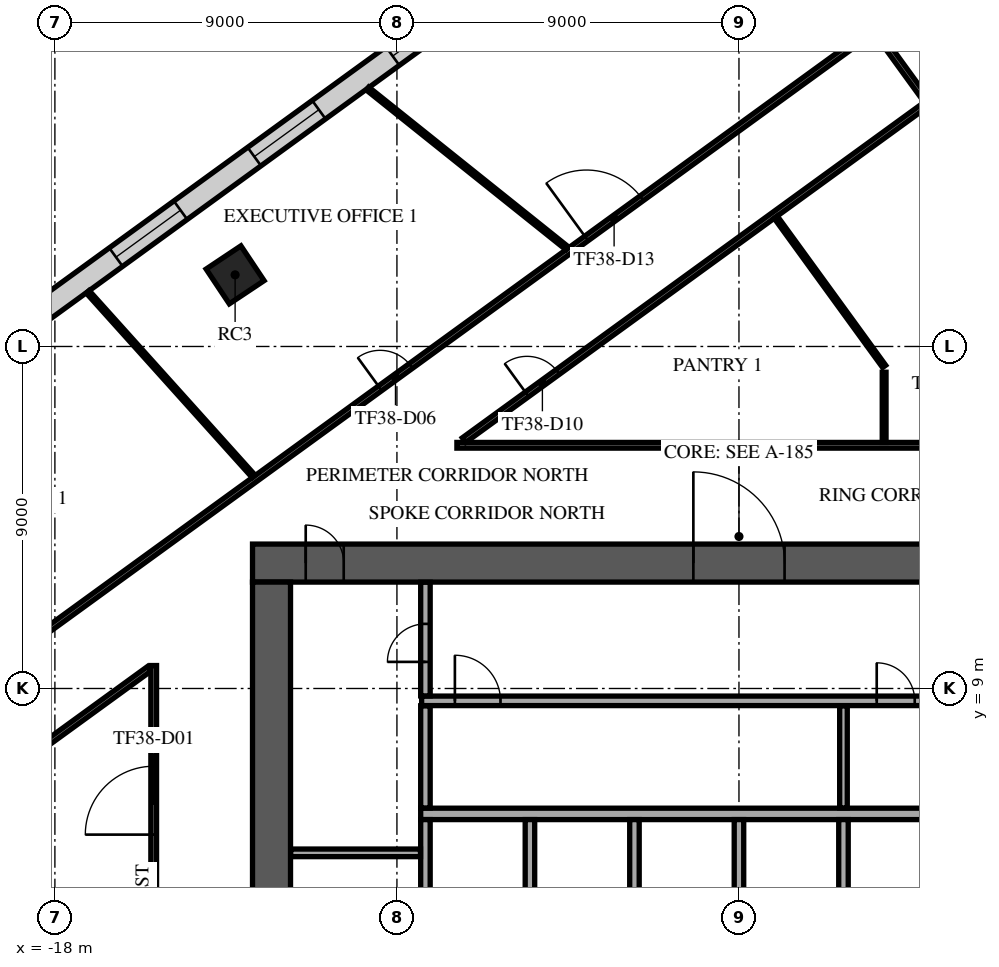
"""IFC4 building model, lengths in metres.
Left out: names, types, materials, properties, quantities, classifications, styles, units other than length and angle.
Written with IfcOpenShell. Run it as: python <this file> out.ifc"""

import sys

from ifc_helpers import new_model, si_unit, direction, frame, frame_2d, origin, origin_2d, place, context, subcontext, project, spatial, rectangle, extrude, element, fill, save


model = new_model("IFC4")
c1 = context("Model", 3, precision=1e-05, world=origin(), true_north=direction((0.0, 1.0)))
c2 = subcontext(c1, "Body", "Model", "MODEL_VIEW")
j1 = project(units=[si_unit("LENGTHUNIT", "METRE"), si_unit("PLANEANGLEUNIT", "RADIAN")], contexts=[c1])
p1 = place(None, origin())
s1 = spatial("IfcSite", under=j1, at=p1, CompositionType="ELEMENT")
p2 = place(p1, origin())
s2 = spatial("IfcBuilding", under=s1, at=p2, CompositionType="ELEMENT")
p3 = place(p2, frame((0.0, 0.0, 163.7)))
s3 = spatial("IfcBuildingStorey", under=s2, at=p3, CompositionType="ELEMENT", Elevation=163.7)
p4 = place(p3, frame((-13.258, 19.885, 0.0), z_axis=(0.0, 0.0, 1.0), x_axis=(0.832028680356, 0.55473261583, 0.0)))
e1 = element("IfcColumn", 1, at=p4, inside=s3, PredefinedType="COLUMN", context=c2, shape_type="SweptSolid", body=[
    extrude(rectangle(XDim=1.1, YDim=1.1, at=origin_2d()), origin(), (0.0, 0.0, 1.0), 4.0),
])
p5 = place(p3, frame((-12.8, 12.3, 0.0), z_axis=(0.0, 0.0, 1.0), x_axis=(1.0, 0.0, 0.0)))
e2 = element("IfcWall", 2, at=p5, inside=s3, PredefinedType="SHEAR", context=c2, shape_type="SweptSolid", body=[
    extrude(rectangle(XDim=25.6, YDim=1.0, at=frame_2d((12.8, 0.0))), origin(), (0.0, 0.0, 1.0), 3.6),
])
p6 = place(p5, frame((11.6, 0.0, 0.0)))
e3 = element("IfcOpeningElement", 3, at=p6, cuts=e2, PredefinedType="OPENING", context=c2, shape_type="SweptSolid", body=[
    extrude(rectangle(XDim=2.4, YDim=2.4, at=frame_2d((1.2, 1.2))), frame((0.0, 0.51, 0.0), z_axis=(0.0, -1.0, 0.0), x_axis=(1.0, 0.0, 0.0)), (0.0, 0.0, 1.0), 1.02),
])
p7 = place(p5, frame((22.425, 0.0, 0.0)))
e4 = element("IfcOpeningElement", 4, at=p7, cuts=e2, PredefinedType="OPENING", context=c2, shape_type="SweptSolid", body=[
    extrude(rectangle(XDim=1.2, YDim=2.1, at=frame_2d((0.6, 1.05))), frame((0.0, 0.51, 0.0), z_axis=(0.0, -1.0, 0.0), x_axis=(1.0, 0.0, 0.0)), (0.0, 0.0, 1.0), 1.02),
])
p8 = place(p5, frame((1.4, 0.0, 0.0)))
e5 = element("IfcOpeningElement", 5, at=p8, cuts=e2, PredefinedType="OPENING", context=c2, shape_type="SweptSolid", body=[
    extrude(rectangle(XDim=1.0, YDim=2.1, at=frame_2d((0.5, 1.05))), frame((0.0, 0.51, 0.0), z_axis=(0.0, -1.0, 0.0), x_axis=(1.0, 0.0, 0.0)), (0.0, 0.0, 1.0), 1.02),
])
p9 = place(p3, frame((-12.3, -11.8, 0.0), z_axis=(0.0, 0.0, 1.0), x_axis=(0.0, 1.0, 0.0)))
e6 = element("IfcWall", 6, at=p9, inside=s3, PredefinedType="SHEAR", context=c2, shape_type="SweptSolid", body=[
    extrude(rectangle(XDim=23.6, YDim=1.0, at=frame_2d((11.8, 0.0))), origin(), (0.0, 0.0, 1.0), 3.6),
])
p10 = place(p9, frame((10.6, 0.0, 0.0)))
e7 = element("IfcOpeningElement", 7, at=p10, cuts=e6, PredefinedType="OPENING", context=c2, shape_type="SweptSolid", body=[
    extrude(rectangle(XDim=2.4, YDim=2.4, at=frame_2d((1.2, 1.2))), frame((0.0, 0.51, 0.0), z_axis=(0.0, -1.0, 0.0), x_axis=(1.0, 0.0, 0.0)), (0.0, 0.0, 1.0), 1.02),
])
p11 = place(p3, frame((-8.375, 5.7, 0.0), z_axis=(0.0, 0.0, 1.0), x_axis=(1.0, 0.0, 0.0)))
e8 = element("IfcWall", 8, at=p11, inside=s3, PredefinedType="SOLIDWALL", context=c2, shape_type="SweptSolid", body=[
    extrude(rectangle(XDim=16.75, YDim=0.3, at=frame_2d((8.375, 0.0))), origin(), (0.0, 0.0, 1.0), 3.6),
])
for number, where, z_axis, x_axis in (
    (9, (-8.25, 2.85, 0.0), (0.0, 0.0, 1.0), (0.0, 1.0, 0.0)),
    (10, (-5.5, 2.85, 0.0), (0.0, 0.0, 1.0), (0.0, 1.0, 0.0)),
    (11, (-2.75, 2.85, 0.0), (0.0, 0.0, 1.0), (0.0, 1.0, 0.0)),
    (12, (0.0, 2.85, 0.0), (0.0, 0.0, 1.0), (0.0, 1.0, 0.0)),
    (13, (2.75, 2.85, 0.0), (0.0, 0.0, 1.0), (0.0, 1.0, 0.0)),
):
    element("IfcWall", number, at=place(p3, frame(where, z_axis=z_axis, x_axis=x_axis)), inside=s3, PredefinedType="SOLIDWALL", context=c2, shape_type="SweptSolid", body=[
        extrude(rectangle(XDim=2.7, YDim=0.25, at=frame_2d((1.35, 0.0))), origin(), (0.0, 0.0, 1.0), 3.6),
    ])
p12 = place(p3, frame((-11.795, 4.675, 0.0), z_axis=(0.0, 0.0, 1.0), x_axis=(1.0, 0.0, 0.0)))
e14 = element("IfcWall", 14, at=p12, inside=s3, PredefinedType="PARTITIONING", context=c2, shape_type="SweptSolid", body=[
    extrude(rectangle(XDim=3.415, YDim=0.2, at=frame_2d((1.708, 0.0))), origin(), (0.0, 0.0, 1.0), 3.6),
])
p13 = place(p3, frame((-8.25, 5.855, 0.0), z_axis=(0.0, 0.0, 1.0), x_axis=(0.0, 1.0, 0.0)))
e15 = element("IfcWall", 15, at=p13, inside=s3, PredefinedType="PARTITIONING", context=c2, shape_type="SweptSolid", body=[
    extrude(rectangle(XDim=2.69, YDim=0.25, at=frame_2d((1.345, 0.0))), origin(), (0.0, 0.0, 1.0), 3.6),
])
p14 = place(p3, frame((2.75, 5.855, 0.0), z_axis=(0.0, 0.0, 1.0), x_axis=(0.0, 1.0, 0.0)))
e16 = element("IfcWall", 16, at=p14, inside=s3, PredefinedType="PARTITIONING", context=c2, shape_type="SweptSolid", body=[
    extrude(rectangle(XDim=2.69, YDim=0.2, at=frame_2d((1.345, 0.0))), origin(), (0.0, 0.0, 1.0), 3.6),
])
p15 = place(p3, frame((-8.35, 8.675, 0.0), z_axis=(0.0, 0.0, 1.0), x_axis=(1.0, 0.0, 0.0)))
e17 = element("IfcWall", 17, at=p15, inside=s3, PredefinedType="PARTITIONING", context=c2, shape_type="SweptSolid", body=[
    extrude(rectangle(XDim=16.72, YDim=0.25, at=frame_2d((8.36, 0.0))), origin(), (0.0, 0.0, 1.0), 3.6),
])
p16 = place(p15, frame((0.875, 0.0, 0.0)))
e18 = element("IfcOpeningElement", 18, at=p16, cuts=e17, PredefinedType="OPENING", context=c2, shape_type="SweptSolid", body=[
    extrude(rectangle(XDim=1.2, YDim=2.1, at=frame_2d((0.6, 1.05))), frame((0.0, 0.135, 0.0), z_axis=(0.0, -1.0, 0.0), x_axis=(1.0, 0.0, 0.0)), (0.0, 0.0, 1.0), 0.27),
])
p17 = place(p15, frame((11.975, 0.0, 0.0)))
e19 = element("IfcOpeningElement", 19, at=p17, cuts=e17, PredefinedType="OPENING", context=c2, shape_type="SweptSolid", body=[
    extrude(rectangle(XDim=1.0, YDim=2.1, at=frame_2d((0.5, 1.05))), frame((0.0, 0.135, 0.0), z_axis=(0.0, -1.0, 0.0), x_axis=(1.0, 0.0, 0.0)), (0.0, 0.0, 1.0), 0.27),
])
p18 = place(p3, frame((-8.25, 8.805, 0.0), z_axis=(0.0, 0.0, 1.0), x_axis=(0.0, 1.0, 0.0)))
e20 = element("IfcWall", 20, at=p18, inside=s3, PredefinedType="PARTITIONING", context=c2, shape_type="SweptSolid", body=[
    extrude(rectangle(XDim=2.99, YDim=0.25, at=frame_2d((1.495, 0.0))), origin(), (0.0, 0.0, 1.0), 3.6),
])
p19 = place(p18, frame((0.895, 0.0, 0.0)))
e21 = element("IfcOpeningElement", 21, at=p19, cuts=e20, PredefinedType="OPENING", context=c2, shape_type="SweptSolid", body=[
    extrude(rectangle(XDim=1.0, YDim=2.1, at=frame_2d((0.5, 1.05))), frame((0.0, 0.135, 0.0), z_axis=(0.0, -1.0, 0.0), x_axis=(1.0, 0.0, 0.0)), (0.0, 0.0, 1.0), 0.27),
])
p20 = place(p3, frame((4.48, 35.516, 0.0), z_axis=(0.0, 0.0, 1.0), x_axis=(-0.809018017995, -0.587783843398, 0.0)))
e22 = element("IfcWall", 22, at=p20, inside=s3, PredefinedType="STANDARD", context=c2, shape_type="SweptSolid", body=[
    extrude(rectangle(XDim=49.376, YDim=0.6, at=frame_2d((24.688, 0.0))), origin(), (0.0, 0.0, 1.0), 3.6),
])
p21 = place(p20, frame((1.2, 0.0, 0.9)))
e23 = element("IfcOpeningElement", 23, at=p21, cuts=e22, PredefinedType="OPENING", context=c2, shape_type="SweptSolid", body=[
    extrude(rectangle(XDim=2.1, YDim=2.1, at=frame_2d((1.05, 1.05))), frame((0.0, 0.31, 0.0), z_axis=(0.0, -1.0, 0.0), x_axis=(1.0, 0.0, 0.0)), (0.0, 0.0, 1.0), 0.62),
])
p22 = place(p20, frame((5.7, 0.0, 0.9)))
e24 = element("IfcOpeningElement", 24, at=p22, cuts=e22, PredefinedType="OPENING", context=c2, shape_type="SweptSolid", body=[
    extrude(rectangle(XDim=2.1, YDim=2.1, at=frame_2d((1.05, 1.05))), frame((0.0, 0.31, 0.0), z_axis=(0.0, -1.0, 0.0), x_axis=(1.0, 0.0, 0.0)), (0.0, 0.0, 1.0), 0.62),
])
p23 = place(p20, frame((10.2, 0.0, 0.9)))
e25 = element("IfcOpeningElement", 25, at=p23, cuts=e22, PredefinedType="OPENING", context=c2, shape_type="SweptSolid", body=[
    extrude(rectangle(XDim=2.1, YDim=2.1, at=frame_2d((1.05, 1.05))), frame((0.0, 0.31, 0.0), z_axis=(0.0, -1.0, 0.0), x_axis=(1.0, 0.0, 0.0)), (0.0, 0.0, 1.0), 0.62),
])
p24 = place(p20, frame((14.7, 0.0, 0.9)))
e26 = element("IfcOpeningElement", 26, at=p24, cuts=e22, PredefinedType="OPENING", context=c2, shape_type="SweptSolid", body=[
    extrude(rectangle(XDim=2.1, YDim=2.1, at=frame_2d((1.05, 1.05))), frame((0.0, 0.31, 0.0), z_axis=(0.0, -1.0, 0.0), x_axis=(1.0, 0.0, 0.0)), (0.0, 0.0, 1.0), 0.62),
])
p25 = place(p20, frame((19.2, 0.0, 0.9)))
e27 = element("IfcOpeningElement", 27, at=p25, cuts=e22, PredefinedType="OPENING", context=c2, shape_type="SweptSolid", body=[
    extrude(rectangle(XDim=2.1, YDim=2.1, at=frame_2d((1.05, 1.05))), frame((0.0, 0.31, 0.0), z_axis=(0.0, -1.0, 0.0), x_axis=(1.0, 0.0, 0.0)), (0.0, 0.0, 1.0), 0.62),
])
p26 = place(p20, frame((23.7, 0.0, 0.9)))
e28 = element("IfcOpeningElement", 28, at=p26, cuts=e22, PredefinedType="OPENING", context=c2, shape_type="SweptSolid", body=[
    extrude(rectangle(XDim=2.1, YDim=2.1, at=frame_2d((1.05, 1.05))), frame((0.0, 0.31, 0.0), z_axis=(0.0, -1.0, 0.0), x_axis=(1.0, 0.0, 0.0)), (0.0, 0.0, 1.0), 0.62),
])
p27 = place(p20, frame((28.2, 0.0, 0.9)))
e29 = element("IfcOpeningElement", 29, at=p27, cuts=e22, PredefinedType="OPENING", context=c2, shape_type="SweptSolid", body=[
    extrude(rectangle(XDim=2.1, YDim=2.1, at=frame_2d((1.05, 1.05))), frame((0.0, 0.31, 0.0), z_axis=(0.0, -1.0, 0.0), x_axis=(1.0, 0.0, 0.0)), (0.0, 0.0, 1.0), 0.62),
])
p28 = place(p20, frame((32.7, 0.0, 0.9)))
e30 = element("IfcOpeningElement", 30, at=p28, cuts=e22, PredefinedType="OPENING", context=c2, shape_type="SweptSolid", body=[
    extrude(rectangle(XDim=2.1, YDim=2.1, at=frame_2d((1.05, 1.05))), frame((0.0, 0.31, 0.0), z_axis=(0.0, -1.0, 0.0), x_axis=(1.0, 0.0, 0.0)), (0.0, 0.0, 1.0), 0.62),
])
p29 = place(p20, frame((37.2, 0.0, 0.9)))
e31 = element("IfcOpeningElement", 31, at=p29, cuts=e22, PredefinedType="OPENING", context=c2, shape_type="SweptSolid", body=[
    extrude(rectangle(XDim=2.1, YDim=2.1, at=frame_2d((1.05, 1.05))), frame((0.0, 0.31, 0.0), z_axis=(0.0, -1.0, 0.0), x_axis=(1.0, 0.0, 0.0)), (0.0, 0.0, 1.0), 0.62),
])
p30 = place(p20, frame((41.7, 0.0, 0.9)))
e32 = element("IfcOpeningElement", 32, at=p30, cuts=e22, PredefinedType="OPENING", context=c2, shape_type="SweptSolid", body=[
    extrude(rectangle(XDim=2.1, YDim=2.1, at=frame_2d((1.05, 1.05))), frame((0.0, 0.31, 0.0), z_axis=(0.0, -1.0, 0.0), x_axis=(1.0, 0.0, 0.0)), (0.0, 0.0, 1.0), 0.62),
])
p31 = place(p20, frame((46.138, 0.0, 0.9)))
e33 = element("IfcOpeningElement", 33, at=p31, cuts=e22, PredefinedType="OPENING", context=c2, shape_type="SweptSolid", body=[
    extrude(rectangle(XDim=2.1, YDim=2.1, at=frame_2d((1.05, 1.05))), frame((0.0, 0.31, 0.0), z_axis=(0.0, -1.0, 0.0), x_axis=(1.0, 0.0, 0.0)), (0.0, 0.0, 1.0), 0.62),
])
p32 = place(p3, frame((-26.166, 4.749, 0.0), z_axis=(0.0, 0.0, 1.0), x_axis=(0.809023795939, 0.587775890628, 0.0)))
e34 = element("IfcWall", 34, at=p32, inside=s3, PredefinedType="PARTITIONING", context=c2, shape_type="SweptSolid", body=[
    extrude(rectangle(XDim=36.756, YDim=0.15, at=frame_2d((18.378, 0.0))), origin(), (0.0, 0.0, 1.0), 3.15),
])
p33 = place(p32, frame((1.8, 0.0, 0.0)))
e35 = element("IfcOpeningElement", 35, at=p33, cuts=e34, PredefinedType="OPENING", context=c2, shape_type="SweptSolid", body=[
    extrude(rectangle(XDim=1.0, YDim=2.1, at=frame_2d((0.5, 1.05))), frame((0.0, 0.085, 0.0), z_axis=(0.0, -1.0, 0.0), x_axis=(1.0, 0.0, 0.0)), (0.0, 0.0, 1.0), 0.17),
])
p34 = place(p32, frame((7.453, 0.0, 0.0)))
e36 = element("IfcOpeningElement", 36, at=p34, cuts=e34, PredefinedType="OPENING", context=c2, shape_type="SweptSolid", body=[
    extrude(rectangle(XDim=1.0, YDim=2.1, at=frame_2d((0.5, 1.05))), frame((0.0, 0.085, 0.0), z_axis=(0.0, -1.0, 0.0), x_axis=(1.0, 0.0, 0.0)), (0.0, 0.0, 1.0), 0.17),
])
p35 = place(p32, frame((20.671, 0.0, 0.0)))
e37 = element("IfcOpeningElement", 37, at=p35, cuts=e34, PredefinedType="OPENING", context=c2, shape_type="SweptSolid", body=[
    extrude(rectangle(XDim=1.0, YDim=2.1, at=frame_2d((0.5, 1.05))), frame((0.0, 0.085, 0.0), z_axis=(0.0, -1.0, 0.0), x_axis=(1.0, 0.0, 0.0)), (0.0, 0.0, 1.0), 0.17),
])
p36 = place(p32, frame((27.382, 0.0, 0.0)))
e38 = element("IfcOpeningElement", 38, at=p36, cuts=e34, PredefinedType="OPENING", context=c2, shape_type="SweptSolid", body=[
    extrude(rectangle(XDim=1.8, YDim=2.1, at=frame_2d((0.9, 1.05))), frame((0.0, 0.085, 0.0), z_axis=(0.0, -1.0, 0.0), x_axis=(1.0, 0.0, 0.0)), (0.0, 0.0, 1.0), 0.17),
])
p37 = place(p3, frame((-24.695, 2.851, 0.0), z_axis=(0.0, 0.0, 1.0), x_axis=(0.809035699289, 0.587759506326, 0.0)))
e39 = element("IfcWall", 39, at=p37, inside=s3, PredefinedType="PARTITIONING", context=c2, shape_type="SweptSolid", body=[
    extrude(rectangle(XDim=11.342, YDim=0.15, at=frame_2d((5.671, 0.0))), origin(), (0.0, 0.0, 1.0), 3.15),
])
p38 = place(p3, frame((-15.4, -8.15, 0.0), z_axis=(0.0, 0.0, 1.0), x_axis=(0.0, 1.0, 0.0)))
e40 = element("IfcWall", 40, at=p38, inside=s3, PredefinedType="PARTITIONING", context=c2, shape_type="SweptSolid", body=[
    extrude(rectangle(XDim=17.754, YDim=0.15, at=frame_2d((8.877, 0.0))), origin(), (0.0, 0.0, 1.0), 3.15),
])
p39 = place(p38, frame((13.304, 0.0, 0.0)))
e41 = element("IfcOpeningElement", 41, at=p39, cuts=e40, PredefinedType="OPENING", context=c2, shape_type="SweptSolid", body=[
    extrude(rectangle(XDim=1.8, YDim=2.1, at=frame_2d((0.9, 1.05))), frame((0.0, 0.085, 0.0), z_axis=(0.0, -1.0, 0.0), x_axis=(1.0, 0.0, 0.0)), (0.0, 0.0, 1.0), 0.17),
])
p40 = place(p3, frame((-7.422, 15.4, 0.0), z_axis=(0.0, 0.0, 1.0), x_axis=(1.0, 0.0, 0.0)))
e42 = element("IfcWall", 42, at=p40, inside=s3, PredefinedType="PARTITIONING", context=c2, shape_type="SweptSolid", body=[
    extrude(rectangle(XDim=20.858, YDim=0.15, at=frame_2d((10.429, 0.0))), origin(), (0.0, 0.0, 1.0), 3.15),
])
p41 = place(p40, frame((12.542, 0.0, 0.0)))
e43 = element("IfcOpeningElement", 43, at=p41, cuts=e42, PredefinedType="OPENING", context=c2, shape_type="SweptSolid", body=[
    extrude(rectangle(XDim=1.0, YDim=2.1, at=frame_2d((0.5, 1.05))), frame((0.0, 0.085, 0.0), z_axis=(0.0, -1.0, 0.0), x_axis=(1.0, 0.0, 0.0)), (0.0, 0.0, 1.0), 0.17),
])
p42 = place(p3, frame((-7.235, 15.536, 0.0), z_axis=(0.0, 0.0, 1.0), x_axis=(0.809007989402, 0.587797646375, 0.0)))
e44 = element("IfcWall", 44, at=p42, inside=s3, PredefinedType="PARTITIONING", context=c2, shape_type="SweptSolid", body=[
    extrude(rectangle(XDim=15.099, YDim=0.15, at=frame_2d((7.55, 0.0))), origin(), (0.0, 0.0, 1.0), 3.15),
])
p43 = place(p42, frame((2.05, 0.0, 0.0)))
e45 = element("IfcOpeningElement", 45, at=p43, cuts=e44, PredefinedType="OPENING", context=c2, shape_type="SweptSolid", body=[
    extrude(rectangle(XDim=1.0, YDim=2.1, at=frame_2d((0.5, 1.05))), frame((0.0, 0.085, 0.0), z_axis=(0.0, -1.0, 0.0), x_axis=(1.0, 0.0, 0.0)), (0.0, 0.0, 1.0), 0.17),
])
p44 = place(p3, frame((3.614, 26.292, 0.0), z_axis=(0.0, 0.0, 1.0), x_axis=(0.587513359373, -0.809214466355, 0.0)))
e46 = element("IfcWall", 46, at=p44, inside=s3, PredefinedType="PARTITIONING", context=c2, shape_type="SweptSolid", body=[
    extrude(rectangle(XDim=2.25, YDim=0.15, at=frame_2d((1.125, 0.0))), origin(), (0.0, 0.0, 1.0), 3.6),
])
p45 = place(p3, frame((-17.136, 19.438, 0.0), z_axis=(0.0, 0.0, 1.0), x_axis=(0.66853916977, -0.743676931526, 0.0)))
e47 = element("IfcWall", 47, at=p45, inside=s3, PredefinedType="PARTITIONING", context=c2, shape_type="SweptSolid", body=[
    extrude(rectangle(XDim=6.531, YDim=0.1, at=frame_2d((3.266, 0.0))), origin(), (0.0, 0.0, 1.0), 2.9),
])
p46 = place(p3, frame((-9.774, 24.787, 0.0), z_axis=(0.0, 0.0, 1.0), x_axis=(0.780787363182, -0.624796841778, 0.0)))
e48 = element("IfcWall", 48, at=p46, inside=s3, PredefinedType="PARTITIONING", context=c2, shape_type="SweptSolid", body=[
    extrude(rectangle(XDim=6.727, YDim=0.1, at=frame_2d((3.363, 0.0))), origin(), (0.0, 0.0, 1.0), 2.9),
])
p47 = place(p3, frame((0.967, 21.403, 0.0), z_axis=(0.0, 0.0, 1.0), x_axis=(0.587746963967, -0.809044811088, 0.0)))
e49 = element("IfcWall", 49, at=p47, inside=s3, PredefinedType="PARTITIONING", context=c2, shape_type="SweptSolid", body=[
    extrude(rectangle(XDim=4.854, YDim=0.1, at=frame_2d((2.427, 0.0))), origin(), (0.0, 0.0, 1.0), 3.15),
])
p48 = place(p3, frame((3.82, 15.475, 0.0), z_axis=(0.0, 0.0, 1.0), x_axis=(0.0, 1.0, 0.0)))
e50 = element("IfcWall", 50, at=p48, inside=s3, PredefinedType="PARTITIONING", context=c2, shape_type="SweptSolid", body=[
    extrude(rectangle(XDim=1.847, YDim=0.1, at=frame_2d((0.923, 0.0))), origin(), (0.0, 0.0, 1.0), 3.6),
])
p49 = place(p6, origin())
e51 = element("IfcDoor", 51, at=p49, inside=s3, OperationType="SINGLE_SWING_LEFT", PredefinedType="DOOR", context=c2, shape_type="SweptSolid", body=[
    extrude(rectangle(XDim=2.4, YDim=2.4, at=frame_2d((1.2, 1.2))), frame((0.0, 0.025, 0.0), z_axis=(0.0, -1.0, 0.0), x_axis=(1.0, 0.0, 0.0)), (0.0, 0.0, 1.0), 0.05),
])
fill(e3, e51)
p50 = place(p8, origin())
e52 = element("IfcDoor", 52, at=p50, inside=s3, OperationType="SINGLE_SWING_LEFT", PredefinedType="DOOR", context=c2, shape_type="SweptSolid", body=[
    extrude(rectangle(XDim=1.0, YDim=2.1, at=frame_2d((0.5, 1.05))), frame((0.0, 0.025, 0.0), z_axis=(0.0, -1.0, 0.0), x_axis=(1.0, 0.0, 0.0)), (0.0, 0.0, 1.0), 0.05),
])
fill(e5, e52)
p51 = place(p19, origin())
e53 = element("IfcDoor", 53, at=p51, inside=s3, OperationType="SINGLE_SWING_LEFT", PredefinedType="DOOR", context=c2, shape_type="SweptSolid", body=[
    extrude(rectangle(XDim=1.0, YDim=2.1, at=frame_2d((0.5, 1.05))), frame((0.0, 0.025, 0.0), z_axis=(0.0, -1.0, 0.0), x_axis=(1.0, 0.0, 0.0)), (0.0, 0.0, 1.0), 0.05),
])
fill(e21, e53)
p52 = place(p16, origin())
e54 = element("IfcDoor", 54, at=p52, inside=s3, OperationType="SINGLE_SWING_LEFT", PredefinedType="DOOR", context=c2, shape_type="SweptSolid", body=[
    extrude(rectangle(XDim=1.2, YDim=2.1, at=frame_2d((0.6, 1.05))), frame((0.0, 0.025, 0.0), z_axis=(0.0, -1.0, 0.0), x_axis=(1.0, 0.0, 0.0)), (0.0, 0.0, 1.0), 0.05),
])
fill(e18, e54)
p53 = place(p17, origin())
e55 = element("IfcDoor", 55, at=p53, inside=s3, OperationType="SINGLE_SWING_LEFT", PredefinedType="DOOR", context=c2, shape_type="SweptSolid", body=[
    extrude(rectangle(XDim=1.0, YDim=2.1, at=frame_2d((0.5, 1.05))), frame((0.0, 0.025, 0.0), z_axis=(0.0, -1.0, 0.0), x_axis=(1.0, 0.0, 0.0)), (0.0, 0.0, 1.0), 0.05),
])
fill(e19, e55)
p54 = place(p24, origin())
e56 = element("IfcWindow", 56, at=p54, inside=s3, PartitioningType="SINGLE_PANEL", PredefinedType="WINDOW", context=c2, shape_type="SweptSolid", body=[
    extrude(rectangle(XDim=2.1, YDim=2.1, at=frame_2d((1.05, 1.05))), frame((0.0, 0.03, 0.0), z_axis=(0.0, -1.0, 0.0), x_axis=(1.0, 0.0, 0.0)), (0.0, 0.0, 1.0), 0.06),
])
fill(e26, e56)
p55 = place(p25, origin())
e57 = element("IfcWindow", 57, at=p55, inside=s3, PartitioningType="SINGLE_PANEL", PredefinedType="WINDOW", context=c2, shape_type="SweptSolid", body=[
    extrude(rectangle(XDim=2.1, YDim=2.1, at=frame_2d((1.05, 1.05))), frame((0.0, 0.03, 0.0), z_axis=(0.0, -1.0, 0.0), x_axis=(1.0, 0.0, 0.0)), (0.0, 0.0, 1.0), 0.06),
])
fill(e27, e57)
p56 = place(p26, origin())
e58 = element("IfcWindow", 58, at=p56, inside=s3, PartitioningType="SINGLE_PANEL", PredefinedType="WINDOW", context=c2, shape_type="SweptSolid", body=[
    extrude(rectangle(XDim=2.1, YDim=2.1, at=frame_2d((1.05, 1.05))), frame((0.0, 0.03, 0.0), z_axis=(0.0, -1.0, 0.0), x_axis=(1.0, 0.0, 0.0)), (0.0, 0.0, 1.0), 0.06),
])
fill(e28, e58)
p57 = place(p39, origin())
e59 = element("IfcDoor", 59, at=p57, inside=s3, OperationType="DOUBLE_DOOR_SINGLE_SWING", PredefinedType="DOOR", context=c2, shape_type="SweptSolid", body=[
    extrude(rectangle(XDim=1.8, YDim=2.1, at=frame_2d((0.9, 1.05))), frame((0.0, 0.025, 0.0), z_axis=(0.0, -1.0, 0.0), x_axis=(1.0, 0.0, 0.0)), (0.0, 0.0, 1.0), 0.05),
])
fill(e41, e59)
p58 = place(p35, origin())
e60 = element("IfcDoor", 60, at=p58, inside=s3, OperationType="SINGLE_SWING_LEFT", PredefinedType="DOOR", context=c2, shape_type="SweptSolid", body=[
    extrude(rectangle(XDim=1.0, YDim=2.1, at=frame_2d((0.5, 1.05))), frame((0.0, 0.025, 0.0), z_axis=(0.0, -1.0, 0.0), x_axis=(1.0, 0.0, 0.0)), (0.0, 0.0, 1.0), 0.05),
])
fill(e37, e60)
p59 = place(p43, frame((1.0, 0.0, 0.0), z_axis=(0.0, 0.0, 1.0), x_axis=(-1.0, 0.0, 0.0)))
e61 = element("IfcDoor", 61, at=p59, inside=s3, OperationType="SINGLE_SWING_LEFT", PredefinedType="DOOR", context=c2, shape_type="SweptSolid", body=[
    extrude(rectangle(XDim=1.0, YDim=2.1, at=frame_2d((0.5, 1.05))), frame((0.0, 0.025, 0.0), z_axis=(0.0, -1.0, 0.0), x_axis=(1.0, 0.0, 0.0)), (0.0, 0.0, 1.0), 0.05),
])
fill(e45, e61)
p60 = place(p36, origin())
e62 = element("IfcDoor", 62, at=p60, inside=s3, OperationType="DOUBLE_DOOR_SINGLE_SWING", PredefinedType="DOOR", context=c2, shape_type="SweptSolid", body=[
    extrude(rectangle(XDim=1.8, YDim=2.1, at=frame_2d((0.9, 1.05))), frame((0.0, 0.025, 0.0), z_axis=(0.0, -1.0, 0.0), x_axis=(1.0, 0.0, 0.0)), (0.0, 0.0, 1.0), 0.05),
])
fill(e38, e62)
save(model, sys.argv[1])
